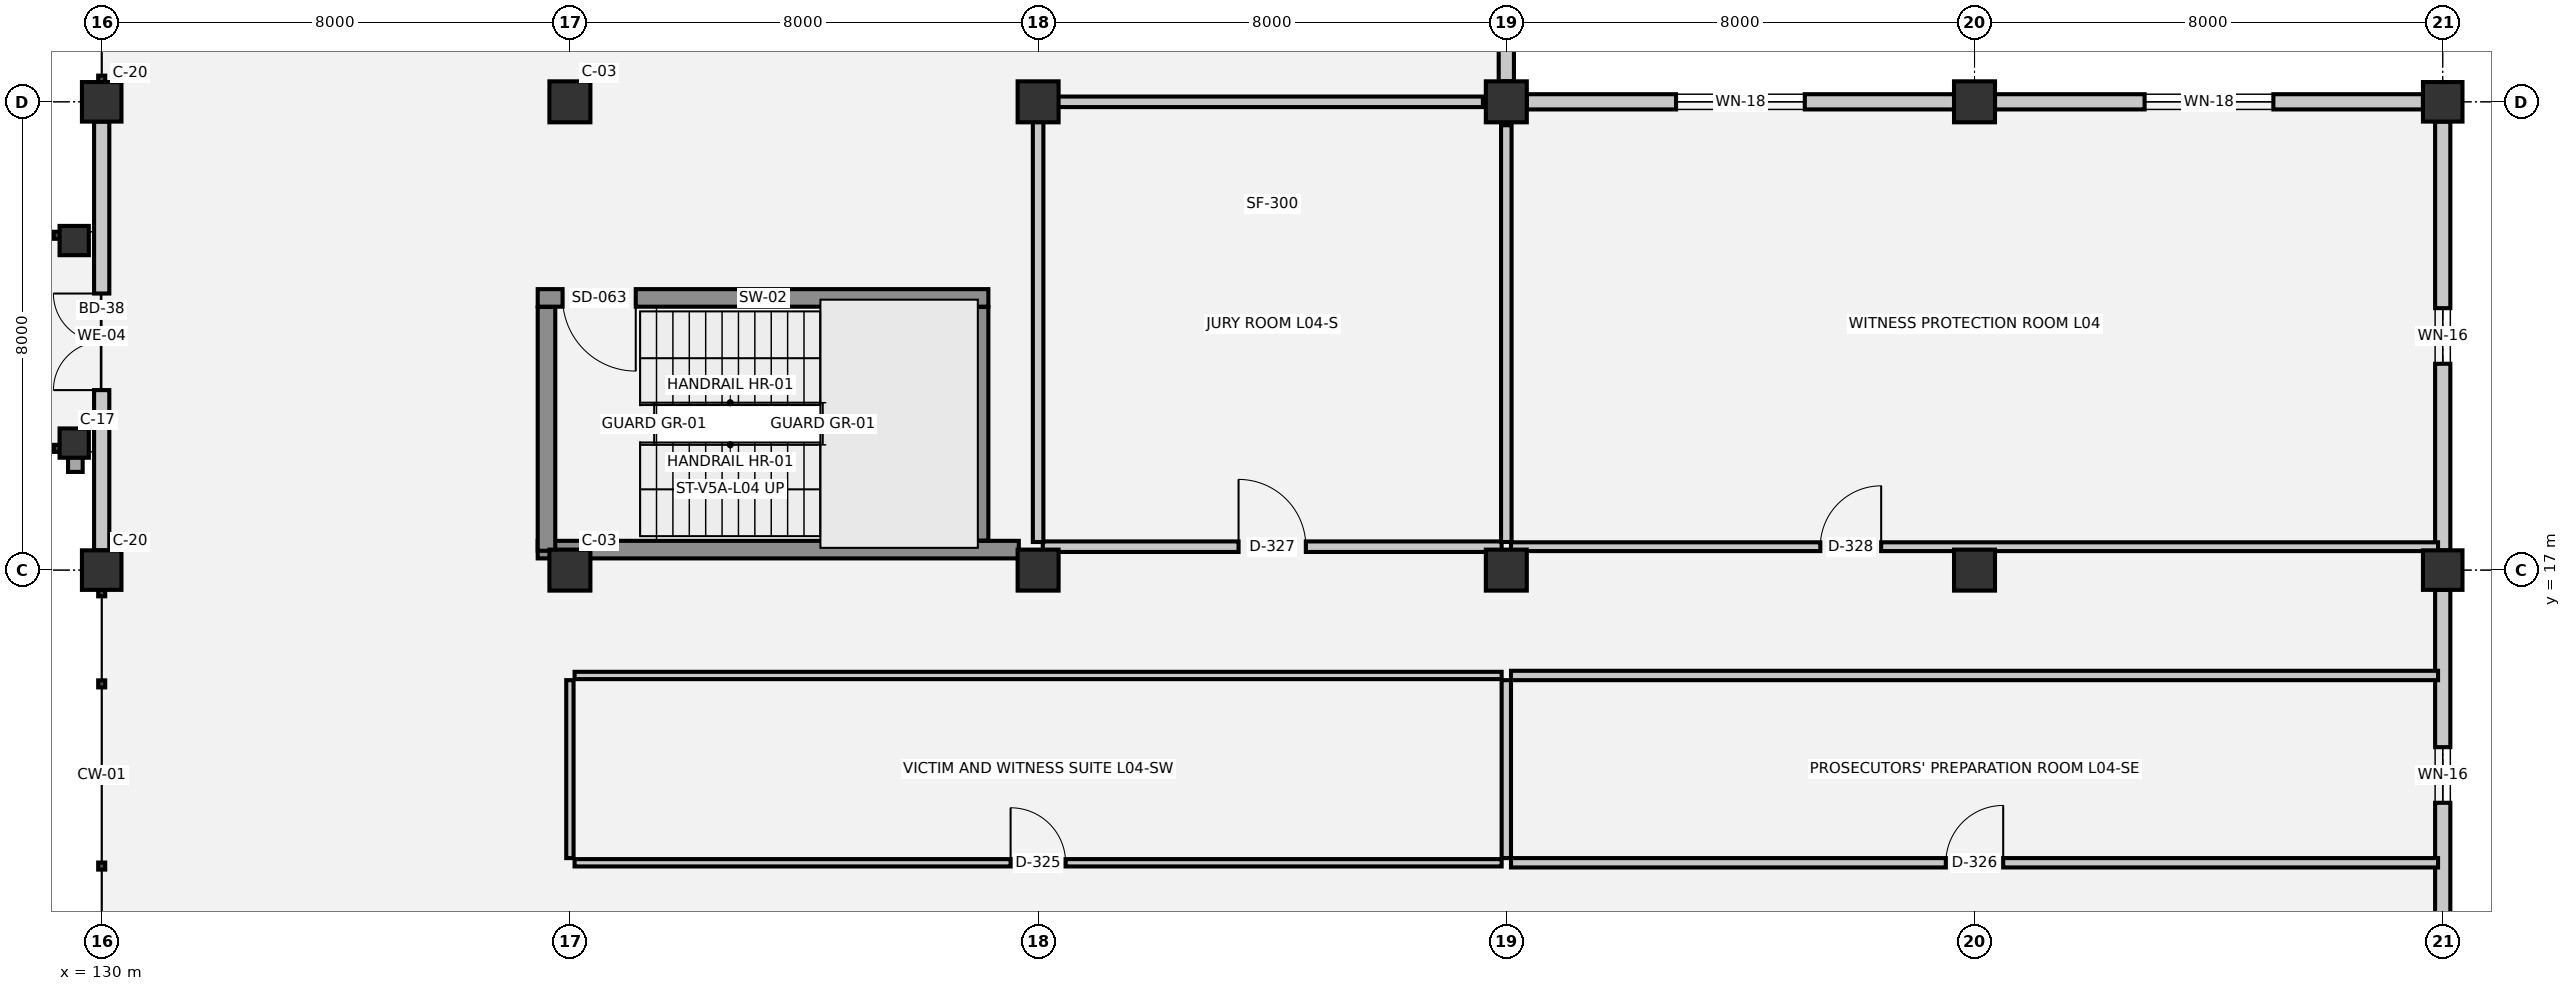
"""IFC4 building model, lengths in metres.
Left out: names, types, materials, properties, quantities, classifications, styles, units other than length and angle.
Written with IfcOpenShell. Run it as: python <this file> out.ifc"""

import sys

from ifc_helpers import new_model, si_unit, direction, frame, frame_2d, origin, origin_2d, place, context, subcontext, project, spatial, rectangle, extrude, element, fill, save


model = new_model("IFC4")
c1 = context("Model", 3, precision=1e-05, world=origin(), true_north=direction((0.0, 1.0)))
c2 = subcontext(c1, "Body", "Model", "MODEL_VIEW")
j1 = project(units=[si_unit("LENGTHUNIT", "METRE"), si_unit("PLANEANGLEUNIT", "RADIAN")], contexts=[c1])
p1 = place(None, origin())
s1 = spatial("IfcSite", under=j1, at=p1, CompositionType="ELEMENT")
p2 = place(p1, origin())
s2 = spatial("IfcBuilding", under=s1, at=p2, CompositionType="ELEMENT")
p3 = place(p2, frame((0.0, 0.0, 14.4)))
s3 = spatial("IfcBuildingStorey", under=s2, at=p3, CompositionType="ELEMENT", Elevation=14.4)
for number, where, z_axis, x_axis in (
    (1, (130.0, 17.0, 0.0), (0.0, 0.0, 1.0), (1.0, 0.0, 0.0)),
    (2, (130.0, 25.0, 0.0), (0.0, 0.0, 1.0), (1.0, 0.0, 0.0)),
):
    element("IfcColumn", number, at=place(p3, frame(where, z_axis=z_axis, x_axis=x_axis)), inside=s3, PredefinedType="COLUMN", context=c2, shape_type="SweptSolid", body=[
        extrude(rectangle(XDim=0.675, YDim=0.675, at=origin_2d()), origin(), (0.0, 0.0, 1.0), 3.9),
    ])
for number, where, z_axis, x_axis in (
    (3, (138.0, 17.0, 0.0), (0.0, 0.0, 1.0), (1.0, 0.0, 0.0)),
    (4, (138.0, 25.0, 0.0), (0.0, 0.0, 1.0), (1.0, 0.0, 0.0)),
    (5, (146.0, 17.0, 0.0), (0.0, 0.0, 1.0), (1.0, 0.0, 0.0)),
    (6, (146.0, 25.0, 0.0), (0.0, 0.0, 1.0), (1.0, 0.0, 0.0)),
    (7, (154.0, 17.0, 0.0), (0.0, 0.0, 1.0), (1.0, 0.0, 0.0)),
    (8, (154.0, 25.0, 0.0), (0.0, 0.0, 1.0), (1.0, 0.0, 0.0)),
    (9, (162.0, 17.0, 0.0), (0.0, 0.0, 1.0), (1.0, 0.0, 0.0)),
    (10, (162.0, 25.0, 0.0), (0.0, 0.0, 1.0), (1.0, 0.0, 0.0)),
):
    element("IfcColumn", number, at=place(p3, frame(where, z_axis=z_axis, x_axis=x_axis)), inside=s3, PredefinedType="COLUMN", context=c2, shape_type="SweptSolid", body=[
        extrude(rectangle(XDim=0.7, YDim=0.7, at=origin_2d()), origin(), (0.0, 0.0, 1.0), 3.9),
    ])
for number, where, z_axis, x_axis in (
    (11, (170.0, 17.0, 0.0), (0.0, 0.0, 1.0), (1.0, 0.0, 0.0)),
    (12, (170.0, 25.0, 0.0), (0.0, 0.0, 1.0), (1.0, 0.0, 0.0)),
):
    element("IfcColumn", number, at=place(p3, frame(where, z_axis=z_axis, x_axis=x_axis)), inside=s3, PredefinedType="COLUMN", context=c2, shape_type="SweptSolid", body=[
        extrude(rectangle(XDim=0.675, YDim=0.675, at=origin_2d()), origin(), (0.0, 0.0, 1.0), 3.9),
    ])
for number, where, z_axis, x_axis in (
    (13, (129.53, 19.17, 0.0), (0.0, 0.0, 1.0), (1.0, 0.0, 0.0)),
    (14, (129.53, 22.63, 0.0), (0.0, 0.0, 1.0), (1.0, 0.0, 0.0)),
):
    element("IfcColumn", number, at=place(p3, frame(where, z_axis=z_axis, x_axis=x_axis)), inside=s3, PredefinedType="COLUMN", context=c2, shape_type="SweptSolid", body=[
        extrude(rectangle(XDim=0.5, YDim=0.5, at=origin_2d()), origin(), (0.0, 0.0, 1.0), 3.67),
    ])
p4 = place(p3, frame((130.0, 17.337, 0.0), z_axis=(0.0, 0.0, 1.0), x_axis=(0.0, 1.0, 0.0)))
e15 = element("IfcWall", 15, at=p4, inside=s3, PredefinedType="SOLIDWALL", context=c2, shape_type="SweptSolid", body=[
    extrude(rectangle(XDim=7.325, YDim=0.26, at=frame_2d((3.663, 0.0))), origin(), (0.0, 0.0, 1.0), 2.61),
])
p5 = place(p4, frame((2.738, 0.0, 0.0)))
e16 = element("IfcOpeningElement", 16, at=p5, cuts=e15, PredefinedType="OPENING", context=c2, shape_type="SweptSolid", body=[
    extrude(rectangle(XDim=1.65, YDim=2.2, at=frame_2d((0.825, 1.1))), frame((0.0, 0.14, 0.0), z_axis=(0.0, -1.0, 0.0), x_axis=(1.0, 0.0, 0.0)), (0.0, 0.0, 1.0), 0.28),
])
p6 = place(p3, frame((154.0, 31.65, 0.0), z_axis=(0.0, 0.0, 1.0), x_axis=(0.0, -1.0, 0.0)))
e17 = element("IfcWall", 17, at=p6, inside=s3, PredefinedType="SOLIDWALL", context=c2, shape_type="SweptSolid", body=[
    extrude(rectangle(XDim=6.3, YDim=0.26, at=frame_2d((3.15, 0.0))), origin(), (0.0, 0.0, 1.0), 2.61),
])
p7 = place(p6, frame((2.675, 0.0, 1.0)))
e18 = element("IfcOpeningElement", 18, at=p7, cuts=e17, PredefinedType="OPENING", context=c2, shape_type="SweptSolid", body=[
    extrude(rectangle(XDim=0.95, YDim=1.1, at=frame_2d((0.475, 0.55))), frame((0.0, 0.14, 0.0), z_axis=(0.0, -1.0, 0.0), x_axis=(1.0, 0.0, 0.0)), (0.0, 0.0, 1.0), 0.28),
])
p8 = place(p3, frame((154.35, 25.0, 0.0), z_axis=(0.0, 0.0, 1.0), x_axis=(1.0, 0.0, 0.0)))
e19 = element("IfcWall", 19, at=p8, inside=s3, PredefinedType="SOLIDWALL", context=c2, shape_type="SweptSolid", body=[
    extrude(rectangle(XDim=7.3, YDim=0.26, at=frame_2d((3.65, 0.0))), origin(), (0.0, 0.0, 1.0), 2.61),
])
p9 = place(p8, frame((2.55, 0.0, 0.9)))
e20 = element("IfcOpeningElement", 20, at=p9, cuts=e19, PredefinedType="OPENING", context=c2, shape_type="SweptSolid", body=[
    extrude(rectangle(XDim=2.2, YDim=1.0, at=frame_2d((1.1, 0.5))), frame((0.0, 0.14, 0.0), z_axis=(0.0, -1.0, 0.0), x_axis=(1.0, 0.0, 0.0)), (0.0, 0.0, 1.0), 0.28),
])
p10 = place(p3, frame((162.35, 25.0, 0.0), z_axis=(0.0, 0.0, 1.0), x_axis=(1.0, 0.0, 0.0)))
e21 = element("IfcWall", 21, at=p10, inside=s3, PredefinedType="SOLIDWALL", context=c2, shape_type="SweptSolid", body=[
    extrude(rectangle(XDim=7.312, YDim=0.26, at=frame_2d((3.656, 0.0))), origin(), (0.0, 0.0, 1.0), 2.61),
])
p11 = place(p10, frame((2.556, 0.0, 0.9)))
e22 = element("IfcOpeningElement", 22, at=p11, cuts=e21, PredefinedType="OPENING", context=c2, shape_type="SweptSolid", body=[
    extrude(rectangle(XDim=2.2, YDim=1.0, at=frame_2d((1.1, 0.5))), frame((0.0, 0.14, 0.0), z_axis=(0.0, -1.0, 0.0), x_axis=(1.0, 0.0, 0.0)), (0.0, 0.0, 1.0), 0.28),
])
p12 = place(p3, frame((170.0, 24.663, 0.0), z_axis=(0.0, 0.0, 1.0), x_axis=(0.0, -1.0, 0.0)))
e23 = element("IfcWall", 23, at=p12, inside=s3, PredefinedType="SOLIDWALL", context=c2, shape_type="SweptSolid", body=[
    extrude(rectangle(XDim=7.325, YDim=0.26, at=frame_2d((3.663, 0.0))), origin(), (0.0, 0.0, 1.0), 2.61),
])
p13 = place(p12, frame((3.188, 0.0, 1.0)))
e24 = element("IfcOpeningElement", 24, at=p13, cuts=e23, PredefinedType="OPENING", context=c2, shape_type="SweptSolid", body=[
    extrude(rectangle(XDim=0.95, YDim=1.1, at=frame_2d((0.475, 0.55))), frame((0.0, 0.14, 0.0), z_axis=(0.0, -1.0, 0.0), x_axis=(1.0, 0.0, 0.0)), (0.0, 0.0, 1.0), 0.28),
])
p14 = place(p3, frame((170.0, 16.663, 0.0), z_axis=(0.0, 0.0, 1.0), x_axis=(0.0, -1.0, 0.0)))
e25 = element("IfcWall", 25, at=p14, inside=s3, PredefinedType="SOLIDWALL", context=c2, shape_type="SweptSolid", body=[
    extrude(rectangle(XDim=6.325, YDim=0.26, at=frame_2d((3.163, 0.0))), origin(), (0.0, 0.0, 1.0), 2.61),
])
p15 = place(p14, frame((2.688, 0.0, 1.0)))
e26 = element("IfcOpeningElement", 26, at=p15, cuts=e25, PredefinedType="OPENING", context=c2, shape_type="SweptSolid", body=[
    extrude(rectangle(XDim=0.95, YDim=1.1, at=frame_2d((0.475, 0.55))), frame((0.0, 0.14, 0.0), z_axis=(0.0, -1.0, 0.0), x_axis=(1.0, 0.0, 0.0)), (0.0, 0.0, 1.0), 0.28),
])
p16 = place(p3, frame((145.15, 21.65, 0.0), z_axis=(0.0, 0.0, 1.0), x_axis=(-1.0, 0.0, 0.0)))
e27 = element("IfcWall", 27, at=p16, inside=s3, PredefinedType="SHEAR", context=c2, shape_type="SweptSolid", body=[
    extrude(rectangle(XDim=7.7, YDim=0.3, at=frame_2d((3.85, 0.0))), origin(), (0.0, 0.0, 1.0), 3.62),
])
p17 = place(p16, frame((6.025, 0.0, 0.0)))
e28 = element("IfcOpeningElement", 28, at=p17, cuts=e27, PredefinedType="OPENING", context=c2, shape_type="SweptSolid", body=[
    extrude(rectangle(XDim=1.25, YDim=2.15, at=frame_2d((0.625, 1.075))), frame((0.0, 0.16, 0.0), z_axis=(0.0, -1.0, 0.0), x_axis=(1.0, 0.0, 0.0)), (0.0, 0.0, 1.0), 0.32),
])
p18 = place(p3, frame((137.45, 17.35, 0.0), z_axis=(0.0, 0.0, 1.0), x_axis=(1.0, 0.0, 0.0)))
e29 = element("IfcWall", 29, at=p18, inside=s3, PredefinedType="SHEAR", context=c2, shape_type="SweptSolid", body=[
    extrude(rectangle(XDim=8.22, YDim=0.3, at=frame_2d((4.11, 0.0))), origin(), (0.0, 0.0, 1.0), 3.62),
])
p19 = place(p3, frame((137.6, 21.495, 0.0), z_axis=(0.0, 0.0, 1.0), x_axis=(0.0, -1.0, 0.0)))
e30 = element("IfcWall", 30, at=p19, inside=s3, PredefinedType="SHEAR", context=c2, shape_type="SweptSolid", body=[
    extrude(rectangle(XDim=4.165, YDim=0.3, at=frame_2d((2.083, 0.0))), origin(), (0.0, 0.0, 1.0), 3.62),
])
p20 = place(p3, frame((145.0, 17.505, 0.0), z_axis=(0.0, 0.0, 1.0), x_axis=(0.0, 1.0, 0.0)))
e31 = element("IfcWall", 31, at=p20, inside=s3, PredefinedType="SHEAR", context=c2, shape_type="SweptSolid", body=[
    extrude(rectangle(XDim=3.99, YDim=0.3, at=frame_2d((1.995, 0.0))), origin(), (0.0, 0.0, 1.0), 3.62),
])
p21 = place(p3, frame((138.08, 12.0, 0.0), z_axis=(0.0, 0.0, 1.0), x_axis=(1.0, 0.0, 0.0)))
e32 = element("IfcWall", 32, at=p21, inside=s3, PredefinedType="PARTITIONING", context=c2, shape_type="SweptSolid", body=[
    extrude(rectangle(XDim=15.84, YDim=0.125, at=frame_2d((7.92, 0.0))), origin(), (0.0, 0.0, 1.0), 3.54),
])
p22 = place(p21, frame((7.45, 0.0, 0.0)))
e33 = element("IfcOpeningElement", 33, at=p22, cuts=e32, PredefinedType="OPENING", context=c2, shape_type="SweptSolid", body=[
    extrude(rectangle(XDim=0.94, YDim=2.15, at=frame_2d((0.47, 1.075))), frame((0.0, 0.073, 0.0), z_axis=(0.0, -1.0, 0.0), x_axis=(1.0, 0.0, 0.0)), (0.0, 0.0, 1.0), 0.145),
])
p23 = place(p3, frame((154.08, 12.0, 0.0), z_axis=(0.0, 0.0, 1.0), x_axis=(1.0, 0.0, 0.0)))
e34 = element("IfcWall", 34, at=p23, inside=s3, PredefinedType="PARTITIONING", context=c2, shape_type="SweptSolid", body=[
    extrude(rectangle(XDim=15.84, YDim=0.16, at=frame_2d((7.92, 0.0))), origin(), (0.0, 0.0, 1.0), 3.54),
])
p24 = place(p23, frame((7.43, 0.0, 0.0)))
e35 = element("IfcOpeningElement", 35, at=p24, cuts=e34, PredefinedType="OPENING", context=c2, shape_type="SweptSolid", body=[
    extrude(rectangle(XDim=0.98, YDim=2.1, at=frame_2d((0.49, 1.05))), frame((0.0, 0.09, 0.0), z_axis=(0.0, -1.0, 0.0), x_axis=(1.0, 0.0, 0.0)), (0.0, 0.0, 1.0), 0.18),
])
p25 = place(p3, frame((138.08, 15.2, 0.0), z_axis=(0.0, 0.0, 1.0), x_axis=(1.0, 0.0, 0.0)))
e36 = element("IfcWall", 36, at=p25, inside=s3, PredefinedType="PARTITIONING", context=c2, shape_type="SweptSolid", body=[
    extrude(rectangle(XDim=15.84, YDim=0.125, at=frame_2d((7.92, 0.0))), origin(), (0.0, 0.0, 1.0), 3.54),
])
p26 = place(p3, frame((154.08, 15.2, 0.0), z_axis=(0.0, 0.0, 1.0), x_axis=(1.0, 0.0, 0.0)))
e37 = element("IfcWall", 37, at=p26, inside=s3, PredefinedType="PARTITIONING", context=c2, shape_type="SweptSolid", body=[
    extrude(rectangle(XDim=15.84, YDim=0.16, at=frame_2d((7.92, 0.0))), origin(), (0.0, 0.0, 1.0), 3.54),
])
p27 = place(p3, frame((146.08, 17.4, 0.0), z_axis=(0.0, 0.0, 1.0), x_axis=(1.0, 0.0, 0.0)))
e38 = element("IfcWall", 38, at=p27, inside=s3, PredefinedType="PARTITIONING", context=c2, shape_type="SweptSolid", body=[
    extrude(rectangle(XDim=7.84, YDim=0.18, at=frame_2d((3.92, 0.0))), origin(), (0.0, 0.0, 1.0), 3.54),
])
p28 = place(p27, frame((3.345, 0.0, 0.0)))
e39 = element("IfcOpeningElement", 39, at=p28, cuts=e38, PredefinedType="OPENING", context=c2, shape_type="SweptSolid", body=[
    extrude(rectangle(XDim=1.15, YDim=2.2, at=frame_2d((0.575, 1.1))), frame((0.0, 0.1, 0.0), z_axis=(0.0, -1.0, 0.0), x_axis=(1.0, 0.0, 0.0)), (0.0, 0.0, 1.0), 0.2),
])
p29 = place(p3, frame((154.08, 17.4, 0.0), z_axis=(0.0, 0.0, 1.0), x_axis=(1.0, 0.0, 0.0)))
e40 = element("IfcWall", 40, at=p29, inside=s3, PredefinedType="PARTITIONING", context=c2, shape_type="SweptSolid", body=[
    extrude(rectangle(XDim=15.84, YDim=0.15, at=frame_2d((7.92, 0.0))), origin(), (0.0, 0.0, 1.0), 3.54),
])
p30 = place(p29, frame((5.285, 0.0, 0.0)))
e41 = element("IfcOpeningElement", 41, at=p30, cuts=e40, PredefinedType="OPENING", context=c2, shape_type="SweptSolid", body=[
    extrude(rectangle(XDim=1.04, YDim=2.15, at=frame_2d((0.52, 1.075))), frame((0.0, 0.085, 0.0), z_axis=(0.0, -1.0, 0.0), x_axis=(1.0, 0.0, 0.0)), (0.0, 0.0, 1.0), 0.17),
])
p31 = place(p3, frame((146.08, 25.0, 0.0), z_axis=(0.0, 0.0, 1.0), x_axis=(1.0, 0.0, 0.0)))
e42 = element("IfcWall", 42, at=p31, inside=s3, PredefinedType="PARTITIONING", context=c2, shape_type="SweptSolid", body=[
    extrude(rectangle(XDim=7.52, YDim=0.18, at=frame_2d((3.76, 0.0))), origin(), (0.0, 0.0, 1.0), 2.93),
])
p32 = place(p3, frame((138.0, 12.08, 0.0), z_axis=(0.0, 0.0, 1.0), x_axis=(0.0, 1.0, 0.0)))
e43 = element("IfcWall", 43, at=p32, inside=s3, PredefinedType="PARTITIONING", context=c2, shape_type="SweptSolid", body=[
    extrude(rectangle(XDim=3.04, YDim=0.125, at=frame_2d((1.52, 0.0))), origin(), (0.0, 0.0, 1.0), 3.08),
])
p33 = place(p3, frame((146.0, 17.48, 0.0), z_axis=(0.0, 0.0, 1.0), x_axis=(0.0, 1.0, 0.0)))
e44 = element("IfcWall", 44, at=p33, inside=s3, PredefinedType="PARTITIONING", context=c2, shape_type="SweptSolid", body=[
    extrude(rectangle(XDim=7.44, YDim=0.18, at=frame_2d((3.72, 0.0))), origin(), (0.0, 0.0, 1.0), 2.68),
])
p34 = place(p3, frame((154.0, 12.08, 0.0), z_axis=(0.0, 0.0, 1.0), x_axis=(0.0, 1.0, 0.0)))
e45 = element("IfcWall", 45, at=p34, inside=s3, PredefinedType="PARTITIONING", context=c2, shape_type="SweptSolid", body=[
    extrude(rectangle(XDim=3.04, YDim=0.16, at=frame_2d((1.52, 0.0))), origin(), (0.0, 0.0, 1.0), 3.08),
])
p35 = place(p3, frame((154.0, 17.48, 0.0), z_axis=(0.0, 0.0, 1.0), x_axis=(0.0, 1.0, 0.0)))
e46 = element("IfcWall", 46, at=p35, inside=s3, PredefinedType="PARTITIONING", context=c2, shape_type="SweptSolid", body=[
    extrude(rectangle(XDim=7.12, YDim=0.18, at=frame_2d((3.56, 0.0))), origin(), (0.0, 0.0, 1.0), 2.68),
])
p36 = place(p5, origin())
e47 = element("IfcDoor", 47, at=p36, inside=s3, OperationType="DOUBLE_DOOR_SINGLE_SWING", PredefinedType="DOOR", context=c2, shape_type="SweptSolid", body=[
    extrude(rectangle(XDim=1.65, YDim=2.2, at=frame_2d((0.825, 1.1))), frame((0.0, 0.025, 0.0), z_axis=(0.0, -1.0, 0.0), x_axis=(1.0, 0.0, 0.0)), (0.0, 0.0, 1.0), 0.05),
])
fill(e16, e47)
p37 = place(p9, origin())
e48 = element("IfcWindow", 48, at=p37, inside=s3, PartitioningType="SINGLE_PANEL", PredefinedType="WINDOW", context=c2, shape_type="SweptSolid", body=[
    extrude(rectangle(XDim=2.2, YDim=1.0, at=frame_2d((1.1, 0.5))), frame((0.0, 0.03, 0.0), z_axis=(0.0, -1.0, 0.0), x_axis=(1.0, 0.0, 0.0)), (0.0, 0.0, 1.0), 0.06),
])
fill(e20, e48)
p38 = place(p11, origin())
e49 = element("IfcWindow", 49, at=p38, inside=s3, PartitioningType="SINGLE_PANEL", PredefinedType="WINDOW", context=c2, shape_type="SweptSolid", body=[
    extrude(rectangle(XDim=2.2, YDim=1.0, at=frame_2d((1.1, 0.5))), frame((0.0, 0.03, 0.0), z_axis=(0.0, -1.0, 0.0), x_axis=(1.0, 0.0, 0.0)), (0.0, 0.0, 1.0), 0.06),
])
fill(e22, e49)
p39 = place(p13, origin())
e50 = element("IfcWindow", 50, at=p39, inside=s3, PartitioningType="SINGLE_PANEL", PredefinedType="WINDOW", context=c2, shape_type="SweptSolid", body=[
    extrude(rectangle(XDim=0.95, YDim=1.1, at=frame_2d((0.475, 0.55))), frame((0.0, 0.03, 0.0), z_axis=(0.0, -1.0, 0.0), x_axis=(1.0, 0.0, 0.0)), (0.0, 0.0, 1.0), 0.06),
])
fill(e24, e50)
p40 = place(p15, origin())
e51 = element("IfcWindow", 51, at=p40, inside=s3, PartitioningType="SINGLE_PANEL", PredefinedType="WINDOW", context=c2, shape_type="SweptSolid", body=[
    extrude(rectangle(XDim=0.95, YDim=1.1, at=frame_2d((0.475, 0.55))), frame((0.0, 0.03, 0.0), z_axis=(0.0, -1.0, 0.0), x_axis=(1.0, 0.0, 0.0)), (0.0, 0.0, 1.0), 0.06),
])
fill(e26, e51)
p41 = place(p17, origin())
e52 = element("IfcDoor", 52, at=p41, inside=s3, OperationType="SINGLE_SWING_LEFT", PredefinedType="DOOR", context=c2, shape_type="SweptSolid", body=[
    extrude(rectangle(XDim=1.25, YDim=2.15, at=frame_2d((0.625, 1.075))), frame((0.0, 0.025, 0.0), z_axis=(0.0, -1.0, 0.0), x_axis=(1.0, 0.0, 0.0)), (0.0, 0.0, 1.0), 0.05),
])
fill(e28, e52)
p42 = place(p22, origin())
e53 = element("IfcDoor", 53, at=p42, inside=s3, OperationType="SINGLE_SWING_LEFT", PredefinedType="DOOR", context=c2, shape_type="SweptSolid", body=[
    extrude(rectangle(XDim=0.94, YDim=2.15, at=frame_2d((0.47, 1.075))), frame((0.0, 0.025, 0.0), z_axis=(0.0, -1.0, 0.0), x_axis=(1.0, 0.0, 0.0)), (0.0, 0.0, 1.0), 0.05),
])
fill(e33, e53)
p43 = place(p24, origin())
e54 = element("IfcDoor", 54, at=p43, inside=s3, OperationType="SINGLE_SWING_RIGHT", PredefinedType="DOOR", context=c2, shape_type="SweptSolid", body=[
    extrude(rectangle(XDim=0.98, YDim=2.1, at=frame_2d((0.49, 1.05))), frame((0.0, 0.025, 0.0), z_axis=(0.0, -1.0, 0.0), x_axis=(1.0, 0.0, 0.0)), (0.0, 0.0, 1.0), 0.05),
])
fill(e35, e54)
p44 = place(p28, origin())
e55 = element("IfcDoor", 55, at=p44, inside=s3, OperationType="SINGLE_SWING_LEFT", PredefinedType="DOOR", context=c2, shape_type="SweptSolid", body=[
    extrude(rectangle(XDim=1.15, YDim=2.2, at=frame_2d((0.575, 1.1))), frame((0.0, 0.025, 0.0), z_axis=(0.0, -1.0, 0.0), x_axis=(1.0, 0.0, 0.0)), (0.0, 0.0, 1.0), 0.05),
])
fill(e39, e55)
p45 = place(p30, origin())
e56 = element("IfcDoor", 56, at=p45, inside=s3, OperationType="SINGLE_SWING_RIGHT", PredefinedType="DOOR", context=c2, shape_type="SweptSolid", body=[
    extrude(rectangle(XDim=1.04, YDim=2.15, at=frame_2d((0.52, 1.075))), frame((0.0, 0.025, 0.0), z_axis=(0.0, -1.0, 0.0), x_axis=(1.0, 0.0, 0.0)), (0.0, 0.0, 1.0), 0.05),
])
fill(e41, e56)
save(model, sys.argv[1])
